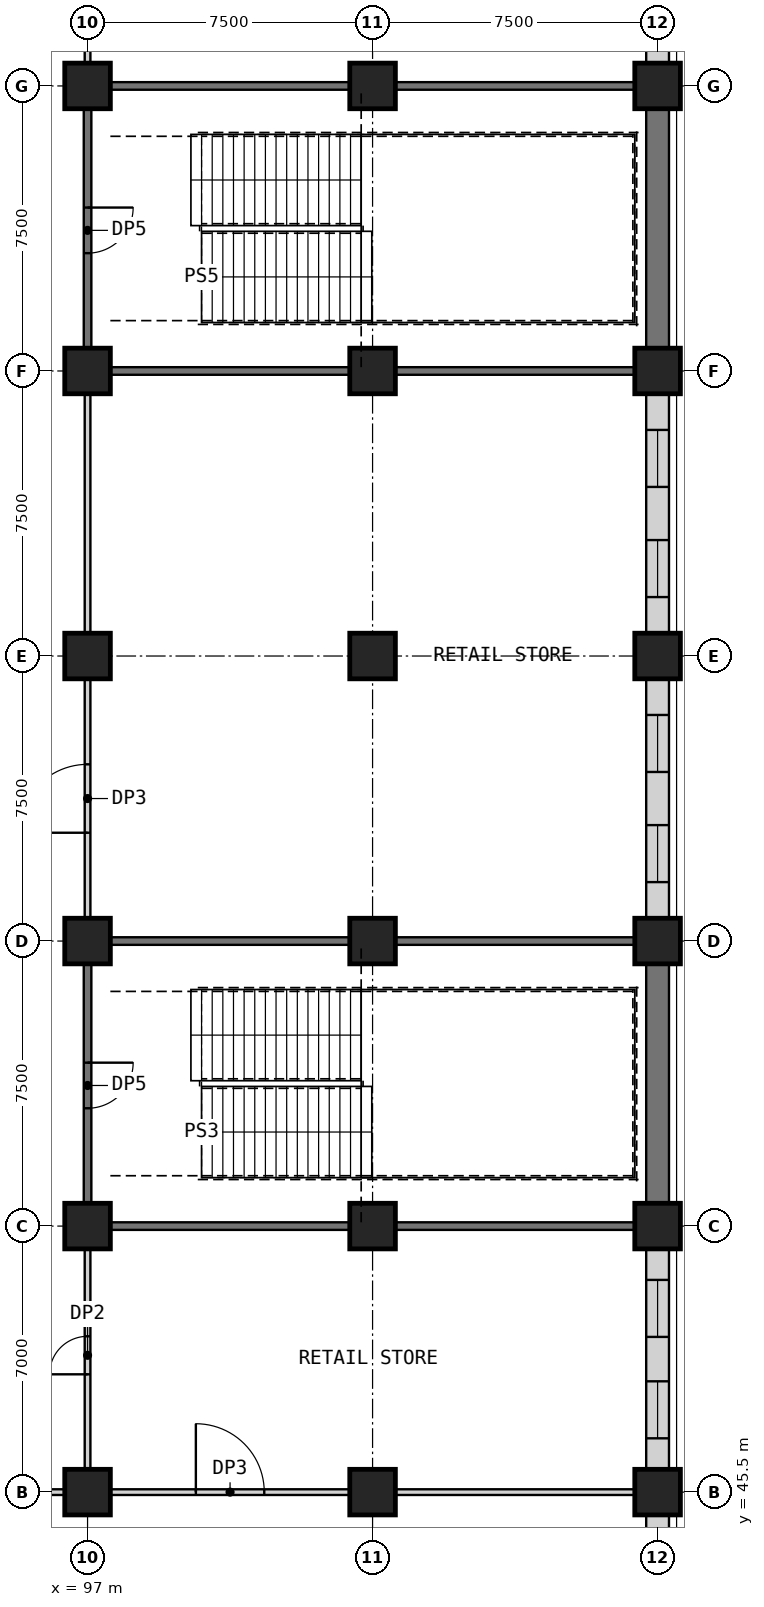
"""IFC4 building model, lengths in metres.
Left out: names, types, materials, properties, quantities, classifications, styles, units other than length and angle.
Written with IfcOpenShell. Run it as: python <this file> out.ifc"""

import sys

from ifc_helpers import new_model, si_unit, direction, frame, frame_2d, origin, origin_2d, place, context, subcontext, project, spatial, rectangle, extrude, element, fill, save


model = new_model("IFC4")
c1 = context("Model", 3, precision=1e-05, world=origin(), true_north=direction((0.0, 1.0)))
c2 = subcontext(c1, "Body", "Model", "MODEL_VIEW")
j1 = project(units=[si_unit("LENGTHUNIT", "METRE"), si_unit("PLANEANGLEUNIT", "RADIAN")], contexts=[c1])
p1 = place(None, origin())
s1 = spatial("IfcSite", under=j1, at=p1, CompositionType="ELEMENT")
p2 = place(p1, origin())
s2 = spatial("IfcBuilding", under=s1, at=p2, CompositionType="ELEMENT")
p3 = place(p2, frame((0.0, 0.0, 8.0)))
s3 = spatial("IfcBuildingStorey", under=s2, at=p3, CompositionType="ELEMENT", Elevation=8.0)
for number, where, z_axis, x_axis in (
    (1, (97.0, 45.5, 0.0), (0.0, 0.0, 1.0), (1.0, 0.0, 0.0)),
    (2, (97.0, 52.5, 0.0), (0.0, 0.0, 1.0), (1.0, 0.0, 0.0)),
    (3, (97.0, 60.0, 0.0), (0.0, 0.0, 1.0), (1.0, 0.0, 0.0)),
    (4, (97.0, 67.5, 0.0), (0.0, 0.0, 1.0), (1.0, 0.0, 0.0)),
    (5, (97.0, 75.0, 0.0), (0.0, 0.0, 1.0), (1.0, 0.0, 0.0)),
    (6, (97.0, 82.5, 0.0), (0.0, 0.0, 1.0), (1.0, 0.0, 0.0)),
    (7, (104.5, 45.5, 0.0), (0.0, 0.0, 1.0), (1.0, 0.0, 0.0)),
    (8, (104.5, 52.5, 0.0), (0.0, 0.0, 1.0), (1.0, 0.0, 0.0)),
    (9, (104.5, 60.0, 0.0), (0.0, 0.0, 1.0), (1.0, 0.0, 0.0)),
    (10, (104.5, 67.5, 0.0), (0.0, 0.0, 1.0), (1.0, 0.0, 0.0)),
    (11, (104.5, 75.0, 0.0), (0.0, 0.0, 1.0), (1.0, 0.0, 0.0)),
    (12, (104.5, 82.5, 0.0), (0.0, 0.0, 1.0), (1.0, 0.0, 0.0)),
    (13, (112.0, 45.5, 0.0), (0.0, 0.0, 1.0), (1.0, 0.0, 0.0)),
    (14, (112.0, 52.5, 0.0), (0.0, 0.0, 1.0), (1.0, 0.0, 0.0)),
    (15, (112.0, 60.0, 0.0), (0.0, 0.0, 1.0), (1.0, 0.0, 0.0)),
    (16, (112.0, 67.5, 0.0), (0.0, 0.0, 1.0), (1.0, 0.0, 0.0)),
    (17, (112.0, 75.0, 0.0), (0.0, 0.0, 1.0), (1.0, 0.0, 0.0)),
    (18, (112.0, 82.5, 0.0), (0.0, 0.0, 1.0), (1.0, 0.0, 0.0)),
):
    element("IfcColumn", number, at=place(p3, frame(where, z_axis=z_axis, x_axis=x_axis)), inside=s3, PredefinedType="COLUMN", context=c2, shape_type="SweptSolid", body=[
        extrude(rectangle(XDim=1.2, YDim=1.2, at=origin_2d()), origin(), (0.0, 0.0, 1.0), 5.5),
    ])
p4 = place(p3, frame((90.0, 45.5, 0.0), z_axis=(0.0, 0.0, 1.0), x_axis=(1.0, 0.0, 0.0)))
e19 = element("IfcWall", 19, at=p4, inside=s3, PredefinedType="PARTITIONING", context=c2, shape_type="SweptSolid", body=[
    extrude(rectangle(XDim=6.4, YDim=0.15, at=frame_2d((3.2, 0.0))), origin(), (0.0, 0.0, 1.0), 5.2),
])
p5 = place(p3, frame((97.6, 45.5, 0.0), z_axis=(0.0, 0.0, 1.0), x_axis=(1.0, 0.0, 0.0)))
e20 = element("IfcWall", 20, at=p5, inside=s3, PredefinedType="PARTITIONING", context=c2, shape_type="SweptSolid", body=[
    extrude(rectangle(XDim=6.3, YDim=0.15, at=frame_2d((3.15, 0.0))), origin(), (0.0, 0.0, 1.0), 5.2),
])
p6 = place(p5, frame((2.25, 0.0, 0.0)))
e21 = element("IfcOpeningElement", 21, at=p6, cuts=e20, PredefinedType="OPENING", context=c2, shape_type="SweptSolid", body=[
    extrude(rectangle(XDim=1.8, YDim=2.4, at=frame_2d((0.9, 1.2))), frame((0.0, 0.085, 0.0), z_axis=(0.0, -1.0, 0.0), x_axis=(1.0, 0.0, 0.0)), (0.0, 0.0, 1.0), 0.17),
])
p7 = place(p3, frame((105.1, 45.5, 0.0), z_axis=(0.0, 0.0, 1.0), x_axis=(1.0, 0.0, 0.0)))
e22 = element("IfcWall", 22, at=p7, inside=s3, PredefinedType="PARTITIONING", context=c2, shape_type="SweptSolid", body=[
    extrude(rectangle(XDim=6.3, YDim=0.15, at=frame_2d((3.15, 0.0))), origin(), (0.0, 0.0, 1.0), 5.2),
])
for number, where, z_axis, x_axis in (
    (23, (97.6, 52.5, 0.0), (0.0, 0.0, 1.0), (1.0, 0.0, 0.0)),
    (24, (105.1, 52.5, 0.0), (0.0, 0.0, 1.0), (1.0, 0.0, 0.0)),
    (25, (97.6, 60.0, 0.0), (0.0, 0.0, 1.0), (1.0, 0.0, 0.0)),
    (26, (105.1, 60.0, 0.0), (0.0, 0.0, 1.0), (1.0, 0.0, 0.0)),
    (27, (97.6, 75.0, 0.0), (0.0, 0.0, 1.0), (1.0, 0.0, 0.0)),
    (28, (105.1, 75.0, 0.0), (0.0, 0.0, 1.0), (1.0, 0.0, 0.0)),
    (29, (97.6, 82.5, 0.0), (0.0, 0.0, 1.0), (1.0, 0.0, 0.0)),
    (30, (105.1, 82.5, 0.0), (0.0, 0.0, 1.0), (1.0, 0.0, 0.0)),
):
    element("IfcWall", number, at=place(p3, frame(where, z_axis=z_axis, x_axis=x_axis)), inside=s3, PredefinedType="SHEAR", context=c2, shape_type="SweptSolid", body=[
        extrude(rectangle(XDim=6.3, YDim=0.2, at=frame_2d((3.15, 0.0))), origin(), (0.0, 0.0, 1.0), 5.2),
    ])
p8 = place(p3, frame((97.0, 46.1, 0.0), z_axis=(0.0, 0.0, 1.0), x_axis=(0.0, 1.0, 0.0)))
e31 = element("IfcWall", 31, at=p8, inside=s3, PredefinedType="PARTITIONING", context=c2, shape_type="SweptSolid", body=[
    extrude(rectangle(XDim=5.8, YDim=0.15, at=frame_2d((2.9, 0.0))), origin(), (0.0, 0.0, 1.0), 5.2),
])
p9 = place(p8, frame((2.5, 0.0, 0.0)))
e32 = element("IfcOpeningElement", 32, at=p9, cuts=e31, PredefinedType="OPENING", context=c2, shape_type="SweptSolid", body=[
    extrude(rectangle(XDim=1.0, YDim=2.1, at=frame_2d((0.5, 1.05))), frame((0.0, 0.085, 0.0), z_axis=(0.0, -1.0, 0.0), x_axis=(1.0, 0.0, 0.0)), (0.0, 0.0, 1.0), 0.17),
])
p10 = place(p3, frame((97.0, 59.4, 0.0), z_axis=(0.0, 0.0, 1.0), x_axis=(0.0, -1.0, 0.0)))
e33 = element("IfcWall", 33, at=p10, inside=s3, PredefinedType="SHEAR", context=c2, shape_type="SweptSolid", body=[
    extrude(rectangle(XDim=6.3, YDim=0.2, at=frame_2d((3.15, 0.0))), origin(), (0.0, 0.0, 1.0), 5.2),
])
p11 = place(p10, frame((2.6, 0.0, 0.0)))
e34 = element("IfcOpeningElement", 34, at=p11, cuts=e33, PredefinedType="OPENING", context=c2, shape_type="SweptSolid", body=[
    extrude(rectangle(XDim=1.2, YDim=2.1, at=frame_2d((0.6, 1.05))), frame((0.0, 0.11, 0.0), z_axis=(0.0, -1.0, 0.0), x_axis=(1.0, 0.0, 0.0)), (0.0, 0.0, 1.0), 0.22),
])
p12 = place(p3, frame((97.0, 60.6, 0.0), z_axis=(0.0, 0.0, 1.0), x_axis=(0.0, 1.0, 0.0)))
e35 = element("IfcWall", 35, at=p12, inside=s3, PredefinedType="PARTITIONING", context=c2, shape_type="SweptSolid", body=[
    extrude(rectangle(XDim=6.3, YDim=0.15, at=frame_2d((3.15, 0.0))), origin(), (0.0, 0.0, 1.0), 5.2),
])
p13 = place(p12, frame((2.25, 0.0, 0.0)))
e36 = element("IfcOpeningElement", 36, at=p13, cuts=e35, PredefinedType="OPENING", context=c2, shape_type="SweptSolid", body=[
    extrude(rectangle(XDim=1.8, YDim=2.4, at=frame_2d((0.9, 1.2))), frame((0.0, 0.085, 0.0), z_axis=(0.0, -1.0, 0.0), x_axis=(1.0, 0.0, 0.0)), (0.0, 0.0, 1.0), 0.17),
])
p14 = place(p3, frame((97.0, 68.1, 0.0), z_axis=(0.0, 0.0, 1.0), x_axis=(0.0, 1.0, 0.0)))
e37 = element("IfcWall", 37, at=p14, inside=s3, PredefinedType="PARTITIONING", context=c2, shape_type="SweptSolid", body=[
    extrude(rectangle(XDim=6.3, YDim=0.15, at=frame_2d((3.15, 0.0))), origin(), (0.0, 0.0, 1.0), 5.2),
])
p15 = place(p3, frame((97.0, 81.9, 0.0), z_axis=(0.0, 0.0, 1.0), x_axis=(0.0, -1.0, 0.0)))
e38 = element("IfcWall", 38, at=p15, inside=s3, PredefinedType="SHEAR", context=c2, shape_type="SweptSolid", body=[
    extrude(rectangle(XDim=6.3, YDim=0.2, at=frame_2d((3.15, 0.0))), origin(), (0.0, 0.0, 1.0), 5.2),
])
p16 = place(p15, frame((2.6, 0.0, 0.0)))
e39 = element("IfcOpeningElement", 39, at=p16, cuts=e38, PredefinedType="OPENING", context=c2, shape_type="SweptSolid", body=[
    extrude(rectangle(XDim=1.2, YDim=2.1, at=frame_2d((0.6, 1.05))), frame((0.0, 0.11, 0.0), z_axis=(0.0, -1.0, 0.0), x_axis=(1.0, 0.0, 0.0)), (0.0, 0.0, 1.0), 0.22),
])
p17 = place(p3, frame((97.0, 83.1, 0.0), z_axis=(0.0, 0.0, 1.0), x_axis=(0.0, 1.0, 0.0)))
e40 = element("IfcWall", 40, at=p17, inside=s3, PredefinedType="PARTITIONING", context=c2, shape_type="SweptSolid", body=[
    extrude(rectangle(XDim=6.3, YDim=0.15, at=frame_2d((3.15, 0.0))), origin(), (0.0, 0.0, 1.0), 5.2),
])
p18 = place(p17, frame((2.25, 0.0, 0.0)))
e41 = element("IfcOpeningElement", 41, at=p18, cuts=e40, PredefinedType="OPENING", context=c2, shape_type="SweptSolid", body=[
    extrude(rectangle(XDim=1.8, YDim=2.4, at=frame_2d((0.9, 1.2))), frame((0.0, 0.085, 0.0), z_axis=(0.0, -1.0, 0.0), x_axis=(1.0, 0.0, 0.0)), (0.0, 0.0, 1.0), 0.17),
])
p19 = place(p3, frame((112.0, 38.6, 0.0), z_axis=(0.0, 0.0, 1.0), x_axis=(0.0, 1.0, 0.0)))
e42 = element("IfcWall", 42, at=p19, inside=s3, PredefinedType="PARTITIONING", context=c2, shape_type="SweptSolid", body=[
    extrude(rectangle(XDim=6.3, YDim=0.6, at=frame_2d((3.15, 0.0))), origin(), (0.0, 0.0, 1.0), 4.6),
])
p20 = place(p19, frame((0.951, 0.0, 0.9)))
e43 = element("IfcOpeningElement", 43, at=p20, cuts=e42, PredefinedType="OPENING", context=c2, shape_type="SweptSolid", body=[
    extrude(rectangle(XDim=1.5, YDim=2.8, at=frame_2d((0.75, 1.4))), frame((0.0, 0.31, 0.0), z_axis=(0.0, -1.0, 0.0), x_axis=(1.0, 0.0, 0.0)), (0.0, 0.0, 1.0), 0.62),
])
p21 = place(p19, frame((3.849, 0.0, 0.9)))
e44 = element("IfcOpeningElement", 44, at=p21, cuts=e42, PredefinedType="OPENING", context=c2, shape_type="SweptSolid", body=[
    extrude(rectangle(XDim=1.5, YDim=2.8, at=frame_2d((0.75, 1.4))), frame((0.0, 0.31, 0.0), z_axis=(0.0, -1.0, 0.0), x_axis=(1.0, 0.0, 0.0)), (0.0, 0.0, 1.0), 0.62),
])
p22 = place(p3, frame((112.0, 46.1, 0.0), z_axis=(0.0, 0.0, 1.0), x_axis=(0.0, 1.0, 0.0)))
e45 = element("IfcWall", 45, at=p22, inside=s3, PredefinedType="PARTITIONING", context=c2, shape_type="SweptSolid", body=[
    extrude(rectangle(XDim=5.8, YDim=0.6, at=frame_2d((2.9, 0.0))), origin(), (0.0, 0.0, 1.0), 4.6),
])
p23 = place(p22, frame((0.816, 0.0, 0.9)))
e46 = element("IfcOpeningElement", 46, at=p23, cuts=e45, PredefinedType="OPENING", context=c2, shape_type="SweptSolid", body=[
    extrude(rectangle(XDim=1.5, YDim=2.8, at=frame_2d((0.75, 1.4))), frame((0.0, 0.31, 0.0), z_axis=(0.0, -1.0, 0.0), x_axis=(1.0, 0.0, 0.0)), (0.0, 0.0, 1.0), 0.62),
])
p24 = place(p22, frame((3.484, 0.0, 0.9)))
e47 = element("IfcOpeningElement", 47, at=p24, cuts=e45, PredefinedType="OPENING", context=c2, shape_type="SweptSolid", body=[
    extrude(rectangle(XDim=1.5, YDim=2.8, at=frame_2d((0.75, 1.4))), frame((0.0, 0.31, 0.0), z_axis=(0.0, -1.0, 0.0), x_axis=(1.0, 0.0, 0.0)), (0.0, 0.0, 1.0), 0.62),
])
p25 = place(p3, frame((112.0, 53.1, 0.0), z_axis=(0.0, 0.0, 1.0), x_axis=(0.0, 1.0, 0.0)))
e48 = element("IfcWall", 48, at=p25, inside=s3, PredefinedType="PARTITIONING", context=c2, shape_type="SweptSolid", body=[
    extrude(rectangle(XDim=6.3, YDim=0.6, at=frame_2d((3.15, 0.0))), origin(), (0.0, 0.0, 1.0), 4.6),
])
p26 = place(p3, frame((112.0, 60.6, 0.0), z_axis=(0.0, 0.0, 1.0), x_axis=(0.0, 1.0, 0.0)))
e49 = element("IfcWall", 49, at=p26, inside=s3, PredefinedType="PARTITIONING", context=c2, shape_type="SweptSolid", body=[
    extrude(rectangle(XDim=6.3, YDim=0.6, at=frame_2d((3.15, 0.0))), origin(), (0.0, 0.0, 1.0), 4.6),
])
p27 = place(p26, frame((0.951, 0.0, 0.9)))
e50 = element("IfcOpeningElement", 50, at=p27, cuts=e49, PredefinedType="OPENING", context=c2, shape_type="SweptSolid", body=[
    extrude(rectangle(XDim=1.5, YDim=2.8, at=frame_2d((0.75, 1.4))), frame((0.0, 0.31, 0.0), z_axis=(0.0, -1.0, 0.0), x_axis=(1.0, 0.0, 0.0)), (0.0, 0.0, 1.0), 0.62),
])
p28 = place(p26, frame((3.849, 0.0, 0.9)))
e51 = element("IfcOpeningElement", 51, at=p28, cuts=e49, PredefinedType="OPENING", context=c2, shape_type="SweptSolid", body=[
    extrude(rectangle(XDim=1.5, YDim=2.8, at=frame_2d((0.75, 1.4))), frame((0.0, 0.31, 0.0), z_axis=(0.0, -1.0, 0.0), x_axis=(1.0, 0.0, 0.0)), (0.0, 0.0, 1.0), 0.62),
])
p29 = place(p3, frame((112.0, 68.1, 0.0), z_axis=(0.0, 0.0, 1.0), x_axis=(0.0, 1.0, 0.0)))
e52 = element("IfcWall", 52, at=p29, inside=s3, PredefinedType="PARTITIONING", context=c2, shape_type="SweptSolid", body=[
    extrude(rectangle(XDim=6.3, YDim=0.6, at=frame_2d((3.15, 0.0))), origin(), (0.0, 0.0, 1.0), 4.6),
])
p30 = place(p29, frame((0.951, 0.0, 0.9)))
e53 = element("IfcOpeningElement", 53, at=p30, cuts=e52, PredefinedType="OPENING", context=c2, shape_type="SweptSolid", body=[
    extrude(rectangle(XDim=1.5, YDim=2.8, at=frame_2d((0.75, 1.4))), frame((0.0, 0.31, 0.0), z_axis=(0.0, -1.0, 0.0), x_axis=(1.0, 0.0, 0.0)), (0.0, 0.0, 1.0), 0.62),
])
p31 = place(p29, frame((3.849, 0.0, 0.9)))
e54 = element("IfcOpeningElement", 54, at=p31, cuts=e52, PredefinedType="OPENING", context=c2, shape_type="SweptSolid", body=[
    extrude(rectangle(XDim=1.5, YDim=2.8, at=frame_2d((0.75, 1.4))), frame((0.0, 0.31, 0.0), z_axis=(0.0, -1.0, 0.0), x_axis=(1.0, 0.0, 0.0)), (0.0, 0.0, 1.0), 0.62),
])
p32 = place(p3, frame((112.0, 75.6, 0.0), z_axis=(0.0, 0.0, 1.0), x_axis=(0.0, 1.0, 0.0)))
e55 = element("IfcWall", 55, at=p32, inside=s3, PredefinedType="PARTITIONING", context=c2, shape_type="SweptSolid", body=[
    extrude(rectangle(XDim=6.3, YDim=0.6, at=frame_2d((3.15, 0.0))), origin(), (0.0, 0.0, 1.0), 4.6),
])
p33 = place(p3, frame((112.0, 83.1, 0.0), z_axis=(0.0, 0.0, 1.0), x_axis=(0.0, 1.0, 0.0)))
e56 = element("IfcWall", 56, at=p33, inside=s3, PredefinedType="PARTITIONING", context=c2, shape_type="SweptSolid", body=[
    extrude(rectangle(XDim=6.3, YDim=0.6, at=frame_2d((3.15, 0.0))), origin(), (0.0, 0.0, 1.0), 4.6),
])
p34 = place(p33, frame((0.951, 0.0, 0.9)))
e57 = element("IfcOpeningElement", 57, at=p34, cuts=e56, PredefinedType="OPENING", context=c2, shape_type="SweptSolid", body=[
    extrude(rectangle(XDim=1.5, YDim=2.8, at=frame_2d((0.75, 1.4))), frame((0.0, 0.31, 0.0), z_axis=(0.0, -1.0, 0.0), x_axis=(1.0, 0.0, 0.0)), (0.0, 0.0, 1.0), 0.62),
])
p35 = place(p33, frame((3.849, 0.0, 0.9)))
e58 = element("IfcOpeningElement", 58, at=p35, cuts=e56, PredefinedType="OPENING", context=c2, shape_type="SweptSolid", body=[
    extrude(rectangle(XDim=1.5, YDim=2.8, at=frame_2d((0.75, 1.4))), frame((0.0, 0.31, 0.0), z_axis=(0.0, -1.0, 0.0), x_axis=(1.0, 0.0, 0.0)), (0.0, 0.0, 1.0), 0.62),
])
p36 = place(p6, origin())
e59 = element("IfcDoor", 59, at=p36, inside=s3, OperationType="SINGLE_SWING_LEFT", PredefinedType="DOOR", context=c2, shape_type="SweptSolid", body=[
    extrude(rectangle(XDim=1.8, YDim=2.4, at=frame_2d((0.9, 1.2))), frame((0.0, 0.025, 0.0), z_axis=(0.0, -1.0, 0.0), x_axis=(1.0, 0.0, 0.0)), (0.0, 0.0, 1.0), 0.05),
])
fill(e21, e59)
p37 = place(p9, origin())
e60 = element("IfcDoor", 60, at=p37, inside=s3, OperationType="SINGLE_SWING_LEFT", PredefinedType="DOOR", context=c2, shape_type="SweptSolid", body=[
    extrude(rectangle(XDim=1.0, YDim=2.1, at=frame_2d((0.5, 1.05))), frame((0.0, 0.025, 0.0), z_axis=(0.0, -1.0, 0.0), x_axis=(1.0, 0.0, 0.0)), (0.0, 0.0, 1.0), 0.05),
])
fill(e32, e60)
p38 = place(p11, origin())
e61 = element("IfcDoor", 61, at=p38, inside=s3, OperationType="SINGLE_SWING_LEFT", PredefinedType="DOOR", context=c2, shape_type="SweptSolid", body=[
    extrude(rectangle(XDim=1.2, YDim=2.1, at=frame_2d((0.6, 1.05))), frame((0.0, 0.025, 0.0), z_axis=(0.0, -1.0, 0.0), x_axis=(1.0, 0.0, 0.0)), (0.0, 0.0, 1.0), 0.05),
])
fill(e34, e61)
p39 = place(p13, origin())
e62 = element("IfcDoor", 62, at=p39, inside=s3, OperationType="SINGLE_SWING_LEFT", PredefinedType="DOOR", context=c2, shape_type="SweptSolid", body=[
    extrude(rectangle(XDim=1.8, YDim=2.4, at=frame_2d((0.9, 1.2))), frame((0.0, 0.025, 0.0), z_axis=(0.0, -1.0, 0.0), x_axis=(1.0, 0.0, 0.0)), (0.0, 0.0, 1.0), 0.05),
])
fill(e36, e62)
p40 = place(p16, origin())
e63 = element("IfcDoor", 63, at=p40, inside=s3, OperationType="SINGLE_SWING_LEFT", PredefinedType="DOOR", context=c2, shape_type="SweptSolid", body=[
    extrude(rectangle(XDim=1.2, YDim=2.1, at=frame_2d((0.6, 1.05))), frame((0.0, 0.025, 0.0), z_axis=(0.0, -1.0, 0.0), x_axis=(1.0, 0.0, 0.0)), (0.0, 0.0, 1.0), 0.05),
])
fill(e39, e63)
p41 = place(p23, origin())
e64 = element("IfcWindow", 64, at=p41, inside=s3, PartitioningType="SINGLE_PANEL", PredefinedType="WINDOW", context=c2, shape_type="SweptSolid", body=[
    extrude(rectangle(XDim=1.5, YDim=2.8, at=frame_2d((0.75, 1.4))), frame((0.0, 0.03, 0.0), z_axis=(0.0, -1.0, 0.0), x_axis=(1.0, 0.0, 0.0)), (0.0, 0.0, 1.0), 0.06),
])
fill(e46, e64)
p42 = place(p24, origin())
e65 = element("IfcWindow", 65, at=p42, inside=s3, PartitioningType="SINGLE_PANEL", PredefinedType="WINDOW", context=c2, shape_type="SweptSolid", body=[
    extrude(rectangle(XDim=1.5, YDim=2.8, at=frame_2d((0.75, 1.4))), frame((0.0, 0.03, 0.0), z_axis=(0.0, -1.0, 0.0), x_axis=(1.0, 0.0, 0.0)), (0.0, 0.0, 1.0), 0.06),
])
fill(e47, e65)
p43 = place(p27, origin())
e66 = element("IfcWindow", 66, at=p43, inside=s3, PartitioningType="SINGLE_PANEL", PredefinedType="WINDOW", context=c2, shape_type="SweptSolid", body=[
    extrude(rectangle(XDim=1.5, YDim=2.8, at=frame_2d((0.75, 1.4))), frame((0.0, 0.03, 0.0), z_axis=(0.0, -1.0, 0.0), x_axis=(1.0, 0.0, 0.0)), (0.0, 0.0, 1.0), 0.06),
])
fill(e50, e66)
p44 = place(p28, origin())
e67 = element("IfcWindow", 67, at=p44, inside=s3, PartitioningType="SINGLE_PANEL", PredefinedType="WINDOW", context=c2, shape_type="SweptSolid", body=[
    extrude(rectangle(XDim=1.5, YDim=2.8, at=frame_2d((0.75, 1.4))), frame((0.0, 0.03, 0.0), z_axis=(0.0, -1.0, 0.0), x_axis=(1.0, 0.0, 0.0)), (0.0, 0.0, 1.0), 0.06),
])
fill(e51, e67)
p45 = place(p30, origin())
e68 = element("IfcWindow", 68, at=p45, inside=s3, PartitioningType="SINGLE_PANEL", PredefinedType="WINDOW", context=c2, shape_type="SweptSolid", body=[
    extrude(rectangle(XDim=1.5, YDim=2.8, at=frame_2d((0.75, 1.4))), frame((0.0, 0.03, 0.0), z_axis=(0.0, -1.0, 0.0), x_axis=(1.0, 0.0, 0.0)), (0.0, 0.0, 1.0), 0.06),
])
fill(e53, e68)
p46 = place(p31, origin())
e69 = element("IfcWindow", 69, at=p46, inside=s3, PartitioningType="SINGLE_PANEL", PredefinedType="WINDOW", context=c2, shape_type="SweptSolid", body=[
    extrude(rectangle(XDim=1.5, YDim=2.8, at=frame_2d((0.75, 1.4))), frame((0.0, 0.03, 0.0), z_axis=(0.0, -1.0, 0.0), x_axis=(1.0, 0.0, 0.0)), (0.0, 0.0, 1.0), 0.06),
])
fill(e54, e69)
save(model, sys.argv[1])
